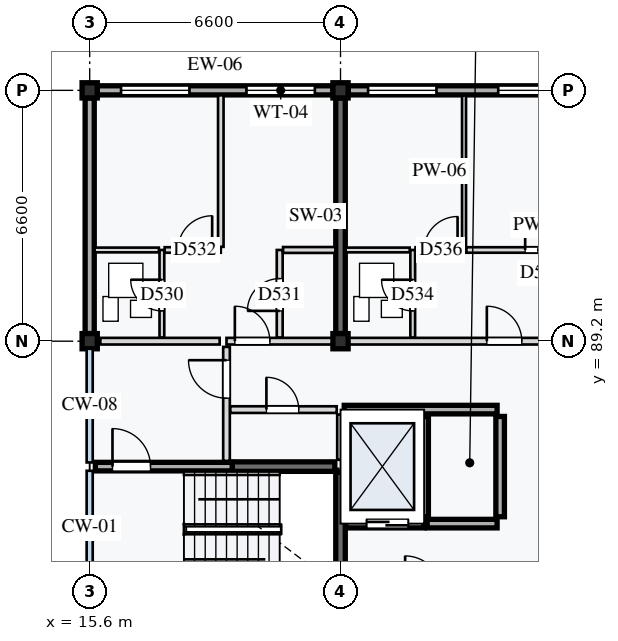
"""IFC4 building model, lengths in metres.
Left out: names, types, materials, properties, quantities, classifications, styles, units other than length and angle.
Written with IfcOpenShell. Run it as: python <this file> out.ifc"""

import sys

from ifc_helpers import new_model, si_unit, direction, frame, frame_2d, origin, origin_2d, place, context, subcontext, project, spatial, rectangle, extrude, element, fill, save


model = new_model("IFC4")
c1 = context("Model", 3, precision=1e-05, world=origin(), true_north=direction((0.0, 1.0)))
c2 = subcontext(c1, "Body", "Model", "MODEL_VIEW")
j1 = project(units=[si_unit("LENGTHUNIT", "METRE"), si_unit("PLANEANGLEUNIT", "RADIAN")], contexts=[c1])
p1 = place(None, origin())
s1 = spatial("IfcSite", under=j1, at=p1, CompositionType="ELEMENT")
p2 = place(p1, origin())
s2 = spatial("IfcBuilding", under=s1, at=p2, CompositionType="ELEMENT")
p3 = place(p2, frame((0.0, 0.0, 53.2)))
s3 = spatial("IfcBuildingStorey", under=s2, at=p3, CompositionType="ELEMENT", Elevation=53.2)
for number, where, z_axis, x_axis in (
    (1, (15.6, 89.2, 0.0), (0.0, 0.0, 1.0), (1.0, 0.0, 0.0)),
    (2, (15.6, 95.8, 0.0), (0.0, 0.0, 1.0), (1.0, 0.0, 0.0)),
    (3, (22.2, 89.2, 0.0), (0.0, 0.0, 1.0), (1.0, 0.0, 0.0)),
    (4, (22.2, 95.8, 0.0), (0.0, 0.0, 1.0), (1.0, 0.0, 0.0)),
):
    element("IfcColumn", number, at=place(p3, frame(where, z_axis=z_axis, x_axis=x_axis)), inside=s3, PredefinedType="COLUMN", context=c2, shape_type="SweptSolid", body=[
        extrude(rectangle(XDim=0.4, YDim=0.4, at=origin_2d()), origin(), (0.0, 0.0, 1.0), 3.2),
    ])
p4 = place(p3, frame((19.35, 85.9, 0.0), z_axis=(0.0, 0.0, 1.0), x_axis=(1.0, 0.0, 0.0)))
e5 = element("IfcWall", 5, at=p4, inside=s3, PredefinedType="SHEAR", context=c2, shape_type="SweptSolid", body=[
    extrude(rectangle(XDim=2.7, YDim=0.25, at=frame_2d((1.35, 0.0))), origin(), (0.0, 0.0, 1.0), 2.98),
])
p5 = place(p3, frame((22.2, 82.95, 0.0), z_axis=(0.0, 0.0, 1.0), x_axis=(0.0, 1.0, 0.0)))
e6 = element("IfcWall", 6, at=p5, inside=s3, PredefinedType="SHEAR", context=c2, shape_type="SweptSolid", body=[
    extrude(rectangle(XDim=2.8, YDim=0.25, at=frame_2d((1.4, 0.0))), origin(), (0.0, 0.0, 1.0), 2.98),
])
p6 = place(p3, frame((22.2, 89.4, 0.0), z_axis=(0.0, 0.0, 1.0), x_axis=(0.0, 1.0, 0.0)))
e7 = element("IfcWall", 7, at=p6, inside=s3, PredefinedType="SHEAR", context=c2, shape_type="SweptSolid", body=[
    extrude(rectangle(XDim=6.2, YDim=0.25, at=frame_2d((3.1, 0.0))), origin(), (0.0, 0.0, 1.0), 2.98),
])
p7 = place(p3, frame((15.8, 95.8, 0.0), z_axis=(0.0, 0.0, 1.0), x_axis=(1.0, 0.0, 0.0)))
e8 = element("IfcWall", 8, at=p7, inside=s3, PredefinedType="STANDARD", context=c2, shape_type="SweptSolid", body=[
    extrude(rectangle(XDim=6.2, YDim=0.24, at=frame_2d((3.1, 0.0))), origin(), (0.0, 0.0, 1.0), 2.6),
])
p8 = place(p7, frame((0.625, 0.0, 0.85)))
e9 = element("IfcOpeningElement", 9, at=p8, cuts=e8, PredefinedType="OPENING", context=c2, shape_type="SweptSolid", body=[
    extrude(rectangle(XDim=1.8, YDim=1.35, at=frame_2d((0.9, 0.675))), frame((0.0, 0.13, 0.0), z_axis=(0.0, -1.0, 0.0), x_axis=(1.0, 0.0, 0.0)), (0.0, 0.0, 1.0), 0.26),
])
p9 = place(p7, frame((3.925, 0.0, 0.85)))
e10 = element("IfcOpeningElement", 10, at=p9, cuts=e8, PredefinedType="OPENING", context=c2, shape_type="SweptSolid", body=[
    extrude(rectangle(XDim=1.8, YDim=1.55, at=frame_2d((0.9, 0.775))), frame((0.0, 0.13, 0.0), z_axis=(0.0, -1.0, 0.0), x_axis=(1.0, 0.0, 0.0)), (0.0, 0.0, 1.0), 0.26),
])
p10 = place(p3, frame((22.4, 95.8, 0.0), z_axis=(0.0, 0.0, 1.0), x_axis=(1.0, 0.0, 0.0)))
e11 = element("IfcWall", 11, at=p10, inside=s3, PredefinedType="STANDARD", context=c2, shape_type="SweptSolid", body=[
    extrude(rectangle(XDim=6.2, YDim=0.24, at=frame_2d((3.1, 0.0))), origin(), (0.0, 0.0, 1.0), 2.6),
])
p11 = place(p10, frame((0.525, 0.0, 0.85)))
e12 = element("IfcOpeningElement", 12, at=p11, cuts=e11, PredefinedType="OPENING", context=c2, shape_type="SweptSolid", body=[
    extrude(rectangle(XDim=1.8, YDim=1.35, at=frame_2d((0.9, 0.675))), frame((0.0, 0.13, 0.0), z_axis=(0.0, -1.0, 0.0), x_axis=(1.0, 0.0, 0.0)), (0.0, 0.0, 1.0), 0.26),
])
p12 = place(p10, frame((3.95, 0.0, 0.85)))
e13 = element("IfcOpeningElement", 13, at=p12, cuts=e11, PredefinedType="OPENING", context=c2, shape_type="SweptSolid", body=[
    extrude(rectangle(XDim=1.8, YDim=1.35, at=frame_2d((0.9, 0.675))), frame((0.0, 0.13, 0.0), z_axis=(0.0, -1.0, 0.0), x_axis=(1.0, 0.0, 0.0)), (0.0, 0.0, 1.0), 0.26),
])
p13 = place(p3, frame((15.6, 89.4, 0.0), z_axis=(0.0, 0.0, 1.0), x_axis=(0.0, 1.0, 0.0)))
e14 = element("IfcWall", 14, at=p13, inside=s3, PredefinedType="STANDARD", context=c2, shape_type="SweptSolid", body=[
    extrude(rectangle(XDim=6.2, YDim=0.24, at=frame_2d((3.1, 0.0))), origin(), (0.0, 0.0, 1.0), 2.65),
])
p14 = place(p3, frame((15.75, 85.9, 0.0), z_axis=(0.0, 0.0, 1.0), x_axis=(1.0, 0.0, 0.0)))
e15 = element("IfcWall", 15, at=p14, inside=s3, PredefinedType="STANDARD", context=c2, shape_type="SweptSolid", body=[
    extrude(rectangle(XDim=3.6, YDim=0.225, at=frame_2d((1.8, 0.0))), origin(), (0.0, 0.0, 1.0), 2.945),
])
p15 = place(p14, frame((0.45, 0.0, 0.0)))
e16 = element("IfcOpeningElement", 16, at=p15, cuts=e15, PredefinedType="OPENING", context=c2, shape_type="SweptSolid", body=[
    extrude(rectangle(XDim=1.0, YDim=2.1, at=frame_2d((0.5, 1.05))), frame((0.0, 0.123, 0.0), z_axis=(0.0, -1.0, 0.0), x_axis=(1.0, 0.0, 0.0)), (0.0, 0.0, 1.0), 0.245),
])
p16 = place(p3, frame((19.2, 86.05, 0.0), z_axis=(0.0, 0.0, 1.0), x_axis=(0.0, 1.0, 0.0)))
e17 = element("IfcWall", 17, at=p16, inside=s3, PredefinedType="PARTITIONING", context=c2, shape_type="SweptSolid", body=[
    extrude(rectangle(XDim=3.0, YDim=0.175, at=frame_2d((1.5, 0.0))), origin(), (0.0, 0.0, 1.0), 2.945),
])
p17 = place(p16, frame((1.65, 0.0, 0.0)))
e18 = element("IfcOpeningElement", 18, at=p17, cuts=e17, PredefinedType="OPENING", context=c2, shape_type="SweptSolid", body=[
    extrude(rectangle(XDim=1.0, YDim=2.16, at=frame_2d((0.5, 1.08))), frame((0.0, 0.097, 0.0), z_axis=(0.0, -1.0, 0.0), x_axis=(1.0, 0.0, 0.0)), (0.0, 0.0, 1.0), 0.195),
])
p18 = place(p3, frame((19.3, 87.4, 0.0), z_axis=(0.0, 0.0, 1.0), x_axis=(1.0, 0.0, 0.0)))
e19 = element("IfcWall", 19, at=p18, inside=s3, PredefinedType="PARTITIONING", context=c2, shape_type="SweptSolid", body=[
    extrude(rectangle(XDim=2.8, YDim=0.175, at=frame_2d((1.4, 0.0))), origin(), (0.0, 0.0, 1.0), 2.945),
])
p19 = place(p18, frame((0.95, 0.0, 0.0)))
e20 = element("IfcOpeningElement", 20, at=p19, cuts=e19, PredefinedType="OPENING", context=c2, shape_type="SweptSolid", body=[
    extrude(rectangle(XDim=0.85, YDim=2.0, at=frame_2d((0.425, 1.0))), frame((0.0, 0.097, 0.0), z_axis=(0.0, -1.0, 0.0), x_axis=(1.0, 0.0, 0.0)), (0.0, 0.0, 1.0), 0.195),
])
p20 = place(p3, frame((22.2, 86.08, 0.0), z_axis=(0.0, 0.0, 1.0), x_axis=(0.0, 1.0, 0.0)))
e21 = element("IfcWall", 21, at=p20, inside=s3, PredefinedType="PARTITIONING", context=c2, shape_type="SweptSolid", body=[
    extrude(rectangle(XDim=1.19, YDim=0.175, at=frame_2d((0.595, 0.0))), origin(), (0.0, 0.0, 1.0), 2.945),
])
p21 = place(p3, frame((22.335, 84.4, 0.0), z_axis=(0.0, 0.0, 1.0), x_axis=(1.0, 0.0, 0.0)))
e22 = element("IfcWall", 22, at=p21, inside=s3, PredefinedType="STANDARD", context=c2, shape_type="SweptSolid", body=[
    extrude(rectangle(XDim=2.065, YDim=0.225, at=frame_2d((1.032, 0.0))), origin(), (0.0, 0.0, 1.0), 2.945),
])
p22 = place(p21, frame((0.55, 0.0, 0.0)))
e23 = element("IfcOpeningElement", 23, at=p22, cuts=e22, PredefinedType="OPENING", context=c2, shape_type="SweptSolid", body=[
    extrude(rectangle(XDim=1.1, YDim=2.1, at=frame_2d((0.55, 1.05))), frame((0.0, 0.123, 0.0), z_axis=(0.0, -1.0, 0.0), x_axis=(1.0, 0.0, 0.0)), (0.0, 0.0, 1.0), 0.245),
])
p23 = place(p3, frame((24.48, 84.4, 0.0), z_axis=(0.0, 0.0, 1.0), x_axis=(1.0, 0.0, 0.0)))
e24 = element("IfcWall", 24, at=p23, inside=s3, PredefinedType="STANDARD", context=c2, shape_type="SweptSolid", body=[
    extrude(rectangle(XDim=1.84, YDim=0.225, at=frame_2d((0.92, 0.0))), origin(), (0.0, 0.0, 1.0), 2.945),
])
p24 = place(p3, frame((22.298, 87.4, 0.0), z_axis=(0.0, 0.0, 1.0), x_axis=(1.0, 0.0, 0.0)))
e25 = element("IfcWall", 25, at=p24, inside=s3, PredefinedType="STANDARD", context=c2, shape_type="SweptSolid", body=[
    extrude(rectangle(XDim=4.022, YDim=0.225, at=frame_2d((2.011, 0.0))), origin(), (0.0, 0.0, 1.0), 2.945),
])
for number, where, z_axis, x_axis in (
    (26, (24.4, 84.58, 0.0), (0.0, 0.0, 1.0), (0.0, 1.0, 0.0)),
    (27, (26.4, 84.58, 0.0), (0.0, 0.0, 1.0), (0.0, 1.0, 0.0)),
):
    element("IfcWall", number, at=place(p3, frame(where, z_axis=z_axis, x_axis=x_axis)), inside=s3, PredefinedType="STANDARD", context=c2, shape_type="SweptSolid", body=[
        extrude(rectangle(XDim=2.64, YDim=0.225, at=frame_2d((1.32, 0.0))), origin(), (0.0, 0.0, 1.0), 2.945),
    ])
p25 = place(p3, frame((15.88, 89.2, 0.0), z_axis=(0.0, 0.0, 1.0), x_axis=(1.0, 0.0, 0.0)))
e28 = element("IfcWall", 28, at=p25, inside=s3, PredefinedType="PARTITIONING", context=c2, shape_type="SweptSolid", body=[
    extrude(rectangle(XDim=3.14, YDim=0.175, at=frame_2d((1.57, 0.0))), origin(), (0.0, 0.0, 1.0), 2.7),
])
p26 = place(p3, frame((19.2, 89.2, 0.0), z_axis=(0.0, 0.0, 1.0), x_axis=(1.0, 0.0, 0.0)))
e29 = element("IfcWall", 29, at=p26, inside=s3, PredefinedType="PARTITIONING", context=c2, shape_type="SweptSolid", body=[
    extrude(rectangle(XDim=3.0, YDim=0.175, at=frame_2d((1.5, 0.0))), origin(), (0.0, 0.0, 1.0), 2.7),
])
p27 = place(p26, frame((0.22, 0.0, 0.0)))
e30 = element("IfcOpeningElement", 30, at=p27, cuts=e29, PredefinedType="OPENING", context=c2, shape_type="SweptSolid", body=[
    extrude(rectangle(XDim=0.92, YDim=2.14, at=frame_2d((0.46, 1.07))), frame((0.0, 0.097, 0.0), z_axis=(0.0, -1.0, 0.0), x_axis=(1.0, 0.0, 0.0)), (0.0, 0.0, 1.0), 0.195),
])
p28 = place(p3, frame((17.5, 89.298, 0.0), z_axis=(0.0, 0.0, 1.0), x_axis=(0.0, 1.0, 0.0)))
e31 = element("IfcWall", 31, at=p28, inside=s3, PredefinedType="PARTITIONING", context=c2, shape_type="SweptSolid", body=[
    extrude(rectangle(XDim=2.302, YDim=0.125, at=frame_2d((1.151, 0.0))), origin(), (0.0, 0.0, 1.0), 2.945),
])
p29 = place(p28, frame((0.7, 0.0, 0.0)))
e32 = element("IfcOpeningElement", 32, at=p29, cuts=e31, PredefinedType="OPENING", context=c2, shape_type="SweptSolid", body=[
    extrude(rectangle(XDim=0.82, YDim=2.05, at=frame_2d((0.41, 1.025))), frame((0.0, 0.073, 0.0), z_axis=(0.0, -1.0, 0.0), x_axis=(1.0, 0.0, 0.0)), (0.0, 0.0, 1.0), 0.145),
])
p30 = place(p3, frame((15.73, 91.6, 0.0), z_axis=(0.0, 0.0, 1.0), x_axis=(1.0, 0.0, 0.0)))
e33 = element("IfcWall", 33, at=p30, inside=s3, PredefinedType="PARTITIONING", context=c2, shape_type="SweptSolid", body=[
    extrude(rectangle(XDim=1.69, YDim=0.125, at=frame_2d((0.845, 0.0))), origin(), (0.0, 0.0, 1.0), 2.945),
])
p31 = place(p3, frame((20.6, 89.298, 0.0), z_axis=(0.0, 0.0, 1.0), x_axis=(0.0, 1.0, 0.0)))
e34 = element("IfcWall", 34, at=p31, inside=s3, PredefinedType="PARTITIONING", context=c2, shape_type="SweptSolid", body=[
    extrude(rectangle(XDim=2.302, YDim=0.155, at=frame_2d((1.151, 0.0))), origin(), (0.0, 0.0, 1.0), 2.945),
])
p32 = place(p31, frame((0.7, 0.0, 0.0)))
e35 = element("IfcOpeningElement", 35, at=p32, cuts=e34, PredefinedType="OPENING", context=c2, shape_type="SweptSolid", body=[
    extrude(rectangle(XDim=0.85, YDim=2.1, at=frame_2d((0.425, 1.05))), frame((0.0, 0.087, 0.0), z_axis=(0.0, -1.0, 0.0), x_axis=(1.0, 0.0, 0.0)), (0.0, 0.0, 1.0), 0.175),
])
p33 = place(p3, frame((20.688, 91.6, 0.0), z_axis=(0.0, 0.0, 1.0), x_axis=(1.0, 0.0, 0.0)))
e36 = element("IfcWall", 36, at=p33, inside=s3, PredefinedType="PARTITIONING", context=c2, shape_type="SweptSolid", body=[
    extrude(rectangle(XDim=1.377, YDim=0.155, at=frame_2d((0.689, 0.0))), origin(), (0.0, 0.0, 1.0), 2.945),
])
p34 = place(p3, frame((17.573, 91.6, 0.0), z_axis=(0.0, 0.0, 1.0), x_axis=(1.0, 0.0, 0.0)))
e37 = element("IfcWall", 37, at=p34, inside=s3, PredefinedType="PARTITIONING", context=c2, shape_type="SweptSolid", body=[
    extrude(rectangle(XDim=1.478, YDim=0.145, at=frame_2d((0.739, 0.0))), origin(), (0.0, 0.0, 1.0), 2.945),
])
p35 = place(p34, frame((0.35, 0.0, 0.0)))
e38 = element("IfcOpeningElement", 38, at=p35, cuts=e37, PredefinedType="OPENING", context=c2, shape_type="SweptSolid", body=[
    extrude(rectangle(XDim=0.9, YDim=2.1, at=frame_2d((0.45, 1.05))), frame((0.0, 0.083, 0.0), z_axis=(0.0, -1.0, 0.0), x_axis=(1.0, 0.0, 0.0)), (0.0, 0.0, 1.0), 0.165),
])
p36 = place(p3, frame((19.05, 91.683, 0.0), z_axis=(0.0, 0.0, 1.0), x_axis=(0.0, 1.0, 0.0)))
e39 = element("IfcWall", 39, at=p36, inside=s3, PredefinedType="PARTITIONING", context=c2, shape_type="SweptSolid", body=[
    extrude(rectangle(XDim=3.987, YDim=0.145, at=frame_2d((1.994, 0.0))), origin(), (0.0, 0.0, 1.0), 2.945),
])
p37 = place(p3, frame((22.2, 89.2, 0.0), z_axis=(0.0, 0.0, 1.0), x_axis=(1.0, 0.0, 0.0)))
e40 = element("IfcWall", 40, at=p37, inside=s3, PredefinedType="PARTITIONING", context=c2, shape_type="SweptSolid", body=[
    extrude(rectangle(XDim=6.6, YDim=0.175, at=frame_2d((3.3, 0.0))), origin(), (0.0, 0.0, 1.0), 2.7),
])
p38 = place(p37, frame((3.85, 0.0, 0.0)))
e41 = element("IfcOpeningElement", 41, at=p38, cuts=e40, PredefinedType="OPENING", context=c2, shape_type="SweptSolid", body=[
    extrude(rectangle(XDim=0.92, YDim=2.14, at=frame_2d((0.46, 1.07))), frame((0.0, 0.097, 0.0), z_axis=(0.0, -1.0, 0.0), x_axis=(1.0, 0.0, 0.0)), (0.0, 0.0, 1.0), 0.195),
])
p39 = place(p3, frame((24.1, 89.298, 0.0), z_axis=(0.0, 0.0, 1.0), x_axis=(0.0, 1.0, 0.0)))
e42 = element("IfcWall", 42, at=p39, inside=s3, PredefinedType="PARTITIONING", context=c2, shape_type="SweptSolid", body=[
    extrude(rectangle(XDim=2.302, YDim=0.125, at=frame_2d((1.151, 0.0))), origin(), (0.0, 0.0, 1.0), 2.945),
])
p40 = place(p39, frame((0.7, 0.0, 0.0)))
e43 = element("IfcOpeningElement", 43, at=p40, cuts=e42, PredefinedType="OPENING", context=c2, shape_type="SweptSolid", body=[
    extrude(rectangle(XDim=0.82, YDim=2.05, at=frame_2d((0.41, 1.025))), frame((0.0, 0.073, 0.0), z_axis=(0.0, -1.0, 0.0), x_axis=(1.0, 0.0, 0.0)), (0.0, 0.0, 1.0), 0.145),
])
p41 = place(p3, frame((22.335, 91.6, 0.0), z_axis=(0.0, 0.0, 1.0), x_axis=(1.0, 0.0, 0.0)))
e44 = element("IfcWall", 44, at=p41, inside=s3, PredefinedType="PARTITIONING", context=c2, shape_type="SweptSolid", body=[
    extrude(rectangle(XDim=1.685, YDim=0.125, at=frame_2d((0.843, 0.0))), origin(), (0.0, 0.0, 1.0), 2.945),
])
p42 = place(p3, frame((24.173, 91.6, 0.0), z_axis=(0.0, 0.0, 1.0), x_axis=(1.0, 0.0, 0.0)))
e45 = element("IfcWall", 45, at=p42, inside=s3, PredefinedType="PARTITIONING", context=c2, shape_type="SweptSolid", body=[
    extrude(rectangle(XDim=1.277, YDim=0.145, at=frame_2d((0.639, 0.0))), origin(), (0.0, 0.0, 1.0), 2.945),
])
p43 = place(p42, frame((0.228, 0.0, 0.0)))
e46 = element("IfcOpeningElement", 46, at=p43, cuts=e45, PredefinedType="OPENING", context=c2, shape_type="SweptSolid", body=[
    extrude(rectangle(XDim=0.88, YDim=2.16, at=frame_2d((0.44, 1.08))), frame((0.0, 0.083, 0.0), z_axis=(0.0, -1.0, 0.0), x_axis=(1.0, 0.0, 0.0)), (0.0, 0.0, 1.0), 0.165),
])
p44 = place(p3, frame((25.45, 91.683, 0.0), z_axis=(0.0, 0.0, 1.0), x_axis=(0.0, 1.0, 0.0)))
e47 = element("IfcWall", 47, at=p44, inside=s3, PredefinedType="PARTITIONING", context=c2, shape_type="SweptSolid", body=[
    extrude(rectangle(XDim=3.987, YDim=0.105, at=frame_2d((1.994, 0.0))), origin(), (0.0, 0.0, 1.0), 2.945),
])
p45 = place(p3, frame((25.512, 91.6, 0.0), z_axis=(0.0, 0.0, 1.0), x_axis=(1.0, 0.0, 0.0)))
e48 = element("IfcWall", 48, at=p45, inside=s3, PredefinedType="PARTITIONING", context=c2, shape_type="SweptSolid", body=[
    extrude(rectangle(XDim=3.88, YDim=0.145, at=frame_2d((1.94, 0.0))), origin(), (0.0, 0.0, 1.0), 2.945),
])
p46 = place(p45, frame((1.546, 0.0, 0.0)))
e49 = element("IfcOpeningElement", 49, at=p46, cuts=e48, PredefinedType="OPENING", context=c2, shape_type="SweptSolid", body=[
    extrude(rectangle(XDim=0.86, YDim=2.12, at=frame_2d((0.43, 1.06))), frame((0.0, 0.083, 0.0), z_axis=(0.0, -1.0, 0.0), x_axis=(1.0, 0.0, 0.0)), (0.0, 0.0, 1.0), 0.165),
])
p47 = place(p8, origin())
e50 = element("IfcWindow", 50, at=p47, inside=s3, PartitioningType="SINGLE_PANEL", PredefinedType="WINDOW", context=c2, shape_type="SweptSolid", body=[
    extrude(rectangle(XDim=1.8, YDim=1.35, at=frame_2d((0.9, 0.675))), frame((0.0, 0.03, 0.0), z_axis=(0.0, -1.0, 0.0), x_axis=(1.0, 0.0, 0.0)), (0.0, 0.0, 1.0), 0.06),
])
fill(e9, e50)
p48 = place(p9, origin())
e51 = element("IfcWindow", 51, at=p48, inside=s3, PartitioningType="SINGLE_PANEL", PredefinedType="WINDOW", context=c2, shape_type="SweptSolid", body=[
    extrude(rectangle(XDim=1.8, YDim=1.55, at=frame_2d((0.9, 0.775))), frame((0.0, 0.03, 0.0), z_axis=(0.0, -1.0, 0.0), x_axis=(1.0, 0.0, 0.0)), (0.0, 0.0, 1.0), 0.06),
])
fill(e10, e51)
p49 = place(p11, origin())
e52 = element("IfcWindow", 52, at=p49, inside=s3, PartitioningType="SINGLE_PANEL", PredefinedType="WINDOW", context=c2, shape_type="SweptSolid", body=[
    extrude(rectangle(XDim=1.8, YDim=1.35, at=frame_2d((0.9, 0.675))), frame((0.0, 0.03, 0.0), z_axis=(0.0, -1.0, 0.0), x_axis=(1.0, 0.0, 0.0)), (0.0, 0.0, 1.0), 0.06),
])
fill(e12, e52)
p50 = place(p12, origin())
e53 = element("IfcWindow", 53, at=p50, inside=s3, PartitioningType="SINGLE_PANEL", PredefinedType="WINDOW", context=c2, shape_type="SweptSolid", body=[
    extrude(rectangle(XDim=1.8, YDim=1.35, at=frame_2d((0.9, 0.675))), frame((0.0, 0.03, 0.0), z_axis=(0.0, -1.0, 0.0), x_axis=(1.0, 0.0, 0.0)), (0.0, 0.0, 1.0), 0.06),
])
fill(e13, e53)
p51 = place(p15, origin())
e54 = element("IfcDoor", 54, at=p51, inside=s3, OperationType="SINGLE_SWING_LEFT", PredefinedType="DOOR", context=c2, shape_type="SweptSolid", body=[
    extrude(rectangle(XDim=1.0, YDim=2.1, at=frame_2d((0.5, 1.05))), frame((0.0, 0.025, 0.0), z_axis=(0.0, -1.0, 0.0), x_axis=(1.0, 0.0, 0.0)), (0.0, 0.0, 1.0), 0.05),
])
fill(e16, e54)
p52 = place(p17, origin())
e55 = element("IfcDoor", 55, at=p52, inside=s3, OperationType="SINGLE_SWING_RIGHT", PredefinedType="DOOR", context=c2, shape_type="SweptSolid", body=[
    extrude(rectangle(XDim=1.0, YDim=2.16, at=frame_2d((0.5, 1.08))), frame((0.0, 0.025, 0.0), z_axis=(0.0, -1.0, 0.0), x_axis=(1.0, 0.0, 0.0)), (0.0, 0.0, 1.0), 0.05),
])
fill(e18, e55)
p53 = place(p19, origin())
e56 = element("IfcDoor", 56, at=p53, inside=s3, OperationType="SINGLE_SWING_LEFT", PredefinedType="DOOR", context=c2, shape_type="SweptSolid", body=[
    extrude(rectangle(XDim=0.85, YDim=2.0, at=frame_2d((0.425, 1.0))), frame((0.0, 0.025, 0.0), z_axis=(0.0, -1.0, 0.0), x_axis=(1.0, 0.0, 0.0)), (0.0, 0.0, 1.0), 0.05),
])
fill(e20, e56)
p54 = place(p22, origin())
e57 = element("IfcDoor", 57, at=p54, inside=s3, OperationType="DOUBLE_DOOR_SLIDING", PredefinedType="DOOR", context=c2, shape_type="SweptSolid", body=[
    extrude(rectangle(XDim=1.1, YDim=2.1, at=frame_2d((0.55, 1.05))), frame((0.0, 0.025, 0.0), z_axis=(0.0, -1.0, 0.0), x_axis=(1.0, 0.0, 0.0)), (0.0, 0.0, 1.0), 0.05),
])
fill(e23, e57)
p55 = place(p27, origin())
e58 = element("IfcDoor", 58, at=p55, inside=s3, OperationType="SINGLE_SWING_LEFT", PredefinedType="DOOR", context=c2, shape_type="SweptSolid", body=[
    extrude(rectangle(XDim=0.92, YDim=2.14, at=frame_2d((0.46, 1.07))), frame((0.0, 0.025, 0.0), z_axis=(0.0, -1.0, 0.0), x_axis=(1.0, 0.0, 0.0)), (0.0, 0.0, 1.0), 0.05),
])
fill(e30, e58)
p56 = place(p29, origin())
e59 = element("IfcDoor", 59, at=p56, inside=s3, OperationType="SINGLE_SWING_RIGHT", PredefinedType="DOOR", context=c2, shape_type="SweptSolid", body=[
    extrude(rectangle(XDim=0.82, YDim=2.05, at=frame_2d((0.41, 1.025))), frame((0.0, 0.025, 0.0), z_axis=(0.0, -1.0, 0.0), x_axis=(1.0, 0.0, 0.0)), (0.0, 0.0, 1.0), 0.05),
])
fill(e32, e59)
p57 = place(p32, origin())
e60 = element("IfcDoor", 60, at=p57, inside=s3, OperationType="SINGLE_SWING_LEFT", PredefinedType="DOOR", context=c2, shape_type="SweptSolid", body=[
    extrude(rectangle(XDim=0.85, YDim=2.1, at=frame_2d((0.425, 1.05))), frame((0.0, 0.025, 0.0), z_axis=(0.0, -1.0, 0.0), x_axis=(1.0, 0.0, 0.0)), (0.0, 0.0, 1.0), 0.05),
])
fill(e35, e60)
p58 = place(p35, origin())
e61 = element("IfcDoor", 61, at=p58, inside=s3, OperationType="SINGLE_SWING_RIGHT", PredefinedType="DOOR", context=c2, shape_type="SweptSolid", body=[
    extrude(rectangle(XDim=0.9, YDim=2.1, at=frame_2d((0.45, 1.05))), frame((0.0, 0.025, 0.0), z_axis=(0.0, -1.0, 0.0), x_axis=(1.0, 0.0, 0.0)), (0.0, 0.0, 1.0), 0.05),
])
fill(e38, e61)
p59 = place(p38, origin())
e62 = element("IfcDoor", 62, at=p59, inside=s3, OperationType="SINGLE_SWING_LEFT", PredefinedType="DOOR", context=c2, shape_type="SweptSolid", body=[
    extrude(rectangle(XDim=0.92, YDim=2.14, at=frame_2d((0.46, 1.07))), frame((0.0, 0.025, 0.0), z_axis=(0.0, -1.0, 0.0), x_axis=(1.0, 0.0, 0.0)), (0.0, 0.0, 1.0), 0.05),
])
fill(e41, e62)
p60 = place(p40, origin())
e63 = element("IfcDoor", 63, at=p60, inside=s3, OperationType="SINGLE_SWING_RIGHT", PredefinedType="DOOR", context=c2, shape_type="SweptSolid", body=[
    extrude(rectangle(XDim=0.82, YDim=2.05, at=frame_2d((0.41, 1.025))), frame((0.0, 0.025, 0.0), z_axis=(0.0, -1.0, 0.0), x_axis=(1.0, 0.0, 0.0)), (0.0, 0.0, 1.0), 0.05),
])
fill(e43, e63)
p61 = place(p43, origin())
e64 = element("IfcDoor", 64, at=p61, inside=s3, OperationType="SINGLE_SWING_RIGHT", PredefinedType="DOOR", context=c2, shape_type="SweptSolid", body=[
    extrude(rectangle(XDim=0.88, YDim=2.16, at=frame_2d((0.44, 1.08))), frame((0.0, 0.025, 0.0), z_axis=(0.0, -1.0, 0.0), x_axis=(1.0, 0.0, 0.0)), (0.0, 0.0, 1.0), 0.05),
])
fill(e46, e64)
p62 = place(p46, origin())
e65 = element("IfcDoor", 65, at=p62, inside=s3, OperationType="SINGLE_SWING_LEFT", PredefinedType="DOOR", context=c2, shape_type="SweptSolid", body=[
    extrude(rectangle(XDim=0.86, YDim=2.12, at=frame_2d((0.43, 1.06))), frame((0.0, 0.025, 0.0), z_axis=(0.0, -1.0, 0.0), x_axis=(1.0, 0.0, 0.0)), (0.0, 0.0, 1.0), 0.05),
])
fill(e49, e65)
save(model, sys.argv[1])
